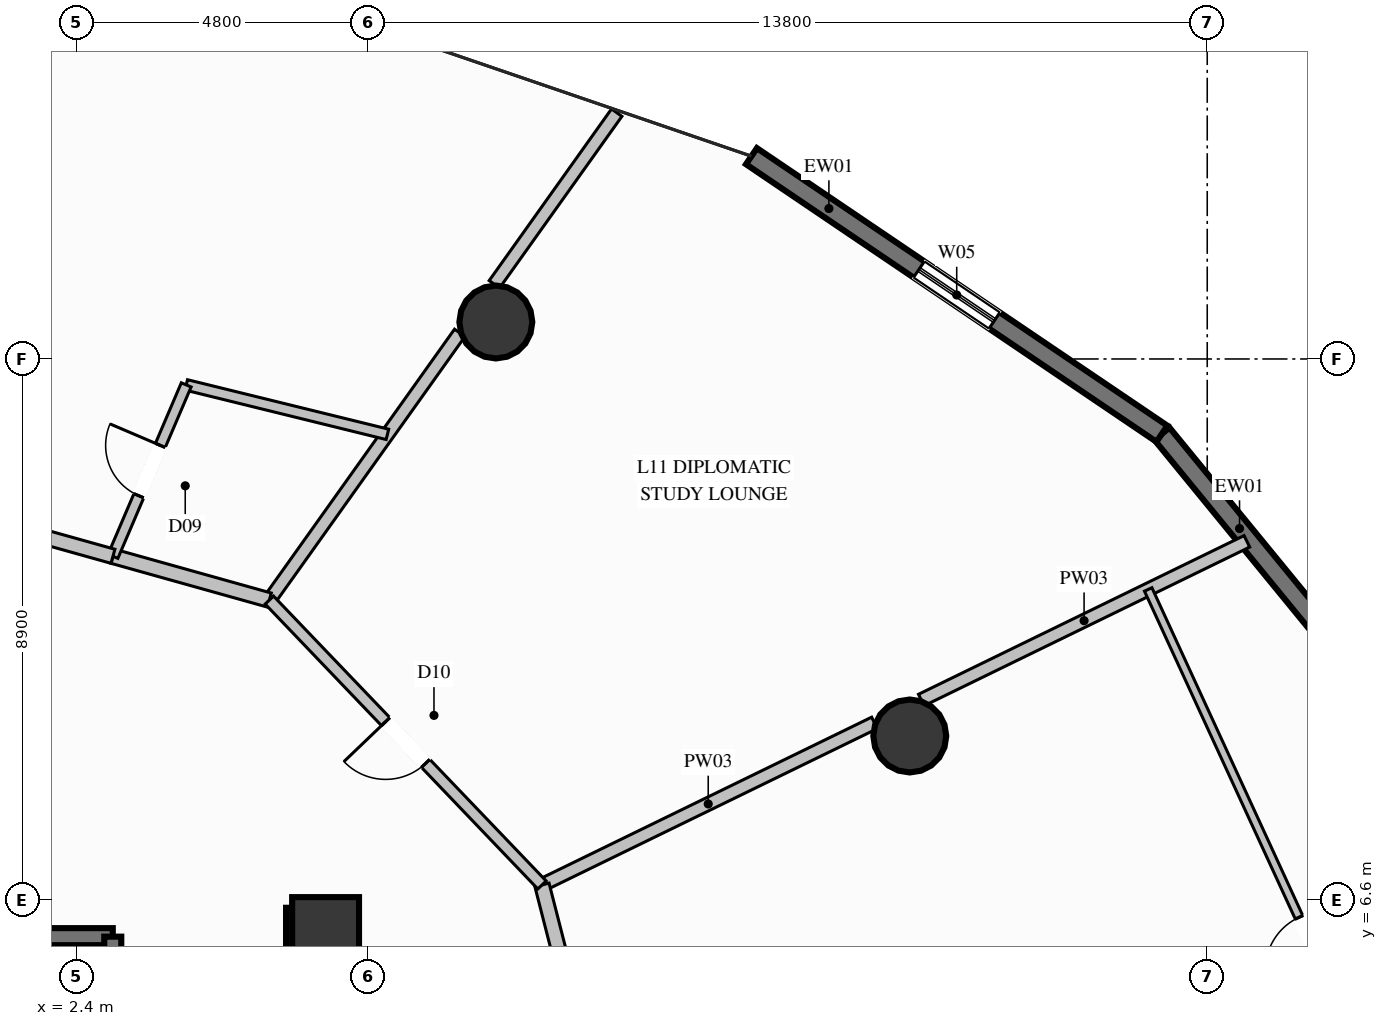
"""IFC4 building model, lengths in metres.
Left out: names, types, materials, properties, quantities, classifications, styles, units other than length and angle.
Written with IfcOpenShell. Run it as: python <this file> out.ifc"""

import sys

from ifc_helpers import new_model, si_unit, direction, frame, frame_2d, origin, origin_2d, place, context, subcontext, project, spatial, rectangle, circle, extrude, element, fill, save


model = new_model("IFC4")
c1 = context("Model", 3, precision=1e-05, world=origin(), true_north=direction((0.0, 1.0)))
c2 = subcontext(c1, "Body", "Model", "MODEL_VIEW")
j1 = project(units=[si_unit("LENGTHUNIT", "METRE"), si_unit("PLANEANGLEUNIT", "RADIAN")], contexts=[c1])
p1 = place(None, origin())
s1 = spatial("IfcSite", under=j1, at=p1, CompositionType="ELEMENT")
p2 = place(p1, origin())
s2 = spatial("IfcBuilding", under=s1, at=p2, CompositionType="ELEMENT")
p3 = place(p2, frame((0.0, 0.0, 50.0)))
s3 = spatial("IfcBuildingStorey", under=s2, at=p3, CompositionType="ELEMENT", Elevation=50.0)
p4 = place(p3, frame((6.5, 6.1, 0.0), z_axis=(0.0, 0.0, 1.0), x_axis=(1.0, 0.0, 0.0)))
e1 = element("IfcColumn", 1, at=p4, inside=s3, PredefinedType="COLUMN", context=c2, shape_type="SweptSolid", body=[
    extrude(rectangle(XDim=1.1, YDim=1.1, at=origin_2d()), origin(), (0.0, 0.0, 1.0), 3.6),
])
p5 = place(p3, frame((5.85, 6.1, 0.0), z_axis=(0.0, 0.0, 1.0), x_axis=(1.0, 0.0, 0.0)))
e2 = element("IfcWall", 2, at=p5, inside=s3, PredefinedType="SHEAR", context=c2, shape_type="SweptSolid", body=[
    extrude(rectangle(XDim=0.275, YDim=0.75, at=frame_2d((0.137, 0.0))), origin(), (0.0, 0.0, 1.0), 3.6),
])
p6 = place(p3, frame((6.5, 3.35, 0.0), z_axis=(0.0, 0.0, 1.0), x_axis=(0.0, 1.0, 0.0)))
e3 = element("IfcWall", 3, at=p6, inside=s3, PredefinedType="SHEAR", context=c2, shape_type="SweptSolid", body=[
    extrude(rectangle(XDim=3.125, YDim=0.75, at=frame_2d((1.562, 0.0))), origin(), (0.0, 0.0, 1.0), 3.6),
])
for number, where, z_axis, x_axis in (
    (4, (16.108, 9.3, 0.0), (0.0, 0.0, 1.0), (1.0, 0.0, 0.0)),
    (5, (9.3, 16.108, 0.0), (0.0, 0.0, 1.0), (1.0, 0.0, 0.0)),
):
    element("IfcColumn", number, at=place(p3, frame(where, z_axis=z_axis, x_axis=x_axis)), inside=s3, PredefinedType="COLUMN", context=c2, shape_type="SweptSolid", body=[
        extrude(circle(Radius=0.6, at=origin_2d()), origin(), (0.0, 0.0, 1.0), 3.6),
    ])
p7 = place(p3, frame((20.255, 14.27, 0.0), z_axis=(0.0, 0.0, 1.0), x_axis=(0.633484495702, -0.773755383636, 0.0)))
e6 = element("IfcWall", 6, at=p7, inside=s3, PredefinedType="SOLIDWALL", context=c2, shape_type="SweptSolid", body=[
    extrude(rectangle(XDim=7.705, YDim=0.32, at=frame_2d((3.853, 0.0))), origin(), (0.0, 0.0, 1.0), 3.34),
])
p8 = place(p7, frame((4.279, 0.0, 0.85)))
e7 = element("IfcOpeningElement", 7, at=p8, cuts=e6, PredefinedType="OPENING", context=c2, shape_type="SweptSolid", body=[
    extrude(rectangle(XDim=1.5, YDim=1.2, at=frame_2d((0.75, 0.6))), frame((0.0, 0.17, 0.0), z_axis=(0.0, -1.0, 0.0), x_axis=(1.0, 0.0, 0.0)), (0.0, 0.0, 1.0), 0.34),
])
p9 = place(p3, frame((13.504, 18.835, 0.0), z_axis=(0.0, 0.0, 1.0), x_axis=(0.828391352283, -0.560149772349, 0.0)))
e8 = element("IfcWall", 8, at=p9, inside=s3, PredefinedType="SOLIDWALL", context=c2, shape_type="SweptSolid", body=[
    extrude(rectangle(XDim=8.149, YDim=0.32, at=frame_2d((4.075, 0.0))), origin(), (0.0, 0.0, 1.0), 3.34),
])
p10 = place(p9, frame((3.325, 0.0, 0.85)))
e9 = element("IfcOpeningElement", 9, at=p10, cuts=e8, PredefinedType="OPENING", context=c2, shape_type="SweptSolid", body=[
    extrude(rectangle(XDim=1.5, YDim=1.2, at=frame_2d((0.75, 0.6))), frame((0.0, 0.17, 0.0), z_axis=(0.0, -1.0, 0.0), x_axis=(1.0, 0.0, 0.0)), (0.0, 0.0, 1.0), 0.34),
])
p11 = place(p3, frame((3.0, 6.0, 0.0), z_axis=(0.0, 0.0, 1.0), x_axis=(-1.0, 0.0, 0.0)))
e10 = element("IfcWall", 10, at=p11, inside=s3, PredefinedType="SOLIDWALL", context=c2, shape_type="SweptSolid", body=[
    extrude(rectangle(XDim=2.2, YDim=0.28, at=frame_2d((1.1, 0.0))), origin(), (0.0, 0.0, 1.0), 3.34),
])
p12 = place(p3, frame((3.0, 3.5, 0.0), z_axis=(0.0, 0.0, 1.0), x_axis=(0.0, 1.0, 0.0)))
e11 = element("IfcWall", 11, at=p12, inside=s3, PredefinedType="SOLIDWALL", context=c2, shape_type="SweptSolid", body=[
    extrude(rectangle(XDim=2.5, YDim=0.28, at=frame_2d((1.25, 0.0))), origin(), (0.0, 0.0, 1.0), 3.34),
])
p13 = place(p3, frame((10.059, 6.85, 0.0), z_axis=(0.0, 0.0, 1.0), x_axis=(0.898932322455, 0.438087525097, 0.0)))
e12 = element("IfcWall", 12, at=p13, inside=s3, PredefinedType="PARTITIONING", context=c2, shape_type="SweptSolid", body=[
    extrude(rectangle(XDim=6.083, YDim=0.21, at=frame_2d((3.042, 0.0))), origin(), (0.0, 0.0, 1.0), 2.708),
])
p14 = place(p3, frame((16.297, 9.891, 0.0), z_axis=(0.0, 0.0, 1.0), x_axis=(0.898922003025, 0.438108699386, 0.0)))
e13 = element("IfcWall", 13, at=p14, inside=s3, PredefinedType="PARTITIONING", context=c2, shape_type="SweptSolid", body=[
    extrude(rectangle(XDim=5.957, YDim=0.21, at=frame_2d((2.979, 0.0))), origin(), (0.0, 0.0, 1.0), 3.34),
])
p15 = place(p3, frame((5.575, 11.535, 0.0), z_axis=(0.0, 0.0, 1.0), x_axis=(0.580317556577, 0.814390283297, 0.0)))
e14 = element("IfcWall", 14, at=p15, inside=s3, PredefinedType="PARTITIONING", context=c2, shape_type="SweptSolid", body=[
    extrude(rectangle(XDim=5.396, YDim=0.21, at=frame_2d((2.698, 0.0))), origin(), (0.0, 0.0, 1.0), 2.708),
])
p16 = place(p3, frame((9.276, 16.728, 0.0), z_axis=(0.0, 0.0, 1.0), x_axis=(0.580431843094, 0.814308833013, 0.0)))
e15 = element("IfcWall", 15, at=p16, inside=s3, PredefinedType="PARTITIONING", context=c2, shape_type="SweptSolid", body=[
    extrude(rectangle(XDim=3.467, YDim=0.21, at=frame_2d((1.733, 0.0))), origin(), (0.0, 0.0, 1.0), 3.34),
])
p17 = place(p3, frame((5.575, 11.535, 0.0), z_axis=(0.0, 0.0, 1.0), x_axis=(-0.962983004146, 0.269562114782, 0.0)))
e16 = element("IfcWall", 16, at=p17, inside=s3, PredefinedType="PARTITIONING", context=c2, shape_type="SweptSolid", body=[
    extrude(rectangle(XDim=2.671, YDim=0.24, at=frame_2d((1.335, 0.0))), origin(), (0.0, 0.0, 1.0), 2.919),
])
p18 = place(p3, frame((7.517, 14.26, 0.0), z_axis=(0.0, 0.0, 1.0), x_axis=(-0.971054260807, 0.238859001441, 0.0)))
e17 = element("IfcWall", 17, at=p18, inside=s3, PredefinedType="PLUMBINGWALL", context=c2, shape_type="SweptSolid", body=[
    extrude(rectangle(XDim=3.408, YDim=0.175, at=frame_2d((1.704, 0.0))), origin(), (0.0, 0.0, 1.0), 3.34),
])
p19 = place(p3, frame((3.003, 12.255, 0.0), z_axis=(0.0, 0.0, 1.0), x_axis=(0.393063770017, 0.919511214016, 0.0)))
e18 = element("IfcWall", 18, at=p19, inside=s3, PredefinedType="PLUMBINGWALL", context=c2, shape_type="SweptSolid", body=[
    extrude(rectangle(XDim=3.066, YDim=0.175, at=frame_2d((1.533, 0.0))), origin(), (0.0, 0.0, 1.0), 3.34),
])
p20 = place(p19, frame((1.083, 0.0, 0.0)))
e19 = element("IfcOpeningElement", 19, at=p20, cuts=e18, PredefinedType="OPENING", context=c2, shape_type="SweptSolid", body=[
    extrude(rectangle(XDim=0.9, YDim=2.1, at=frame_2d((0.45, 1.05))), frame((0.0, 0.098, 0.0), z_axis=(0.0, -1.0, 0.0), x_axis=(1.0, 0.0, 0.0)), (0.0, 0.0, 1.0), 0.195),
])
p21 = place(p3, frame((3.003, 12.255, 0.0), z_axis=(0.0, 0.0, 1.0), x_axis=(-0.962944088122, 0.269701099648, 0.0)))
e20 = element("IfcWall", 20, at=p21, inside=s3, PredefinedType="PARTITIONING", context=c2, shape_type="SweptSolid", body=[
    extrude(rectangle(XDim=3.69, YDim=0.24, at=frame_2d((1.845, 0.0))), origin(), (0.0, 0.0, 1.0), 2.919),
])
p22 = place(p21, frame((1.295, 0.0, 0.0)))
e21 = element("IfcOpeningElement", 21, at=p22, cuts=e20, PredefinedType="OPENING", context=c2, shape_type="SweptSolid", body=[
    extrude(rectangle(XDim=1.1, YDim=2.3, at=frame_2d((0.55, 1.15))), frame((0.0, 0.13, 0.0), z_axis=(0.0, -1.0, 0.0), x_axis=(1.0, 0.0, 0.0)), (0.0, 0.0, 1.0), 0.26),
])
p23 = place(p3, frame((11.7, 0.45, 0.0), z_axis=(0.0, 0.0, 1.0), x_axis=(-0.248347790771, 0.968670932164, 0.0)))
e22 = element("IfcWall", 22, at=p23, inside=s3, PredefinedType="PARTITIONING", context=c2, shape_type="SweptSolid", body=[
    extrude(rectangle(XDim=6.607, YDim=0.24, at=frame_2d((3.304, 0.0))), origin(), (0.0, 0.0, 1.0), 2.919),
])
p24 = place(p3, frame((25.387, 0.063, 0.0), z_axis=(0.0, 0.0, 1.0), x_axis=(-0.417925097851, 0.9084814872, 0.0)))
e23 = element("IfcWall", 23, at=p24, inside=s3, PredefinedType="PARTITIONING", context=c2, shape_type="SweptSolid", body=[
    extrude(rectangle(XDim=12.82, YDim=0.135, at=frame_2d((6.41, 0.0))), origin(), (0.0, 0.0, 1.0), 2.807),
])
p25 = place(p24, frame((5.935, 0.0, 0.0)))
e24 = element("IfcOpeningElement", 24, at=p25, cuts=e23, PredefinedType="OPENING", context=c2, shape_type="SweptSolid", body=[
    extrude(rectangle(XDim=0.95, YDim=2.1, at=frame_2d((0.475, 1.05))), frame((0.0, 0.078, 0.0), z_axis=(0.0, -1.0, 0.0), x_axis=(1.0, 0.0, 0.0)), (0.0, 0.0, 1.0), 0.155),
])
p26 = place(p3, frame((10.059, 6.85, 0.0), z_axis=(0.0, 0.0, 1.0), x_axis=(-0.691464507588, 0.722410433719, 0.0)))
e25 = element("IfcWall", 25, at=p26, inside=s3, PredefinedType="PARTITIONING", context=c2, shape_type="SweptSolid", body=[
    extrude(rectangle(XDim=6.485, YDim=0.19, at=frame_2d((3.242, 0.0))), origin(), (0.0, 0.0, 1.0), 3.34),
])
p27 = place(p26, frame((2.768, 0.0, 0.0)))
e26 = element("IfcOpeningElement", 26, at=p27, cuts=e25, PredefinedType="OPENING", context=c2, shape_type="SweptSolid", body=[
    extrude(rectangle(XDim=0.95, YDim=2.1, at=frame_2d((0.475, 1.05))), frame((0.0, 0.105, 0.0), z_axis=(0.0, -1.0, 0.0), x_axis=(1.0, 0.0, 0.0)), (0.0, 0.0, 1.0), 0.21),
])
p28 = place(p10, origin())
e27 = element("IfcWindow", 27, at=p28, inside=s3, PartitioningType="SINGLE_PANEL", PredefinedType="WINDOW", context=c2, shape_type="SweptSolid", body=[
    extrude(rectangle(XDim=1.5, YDim=1.2, at=frame_2d((0.75, 0.6))), frame((0.0, 0.03, 0.0), z_axis=(0.0, -1.0, 0.0), x_axis=(1.0, 0.0, 0.0)), (0.0, 0.0, 1.0), 0.06),
])
fill(e9, e27)
p29 = place(p20, origin())
e28 = element("IfcDoor", 28, at=p29, inside=s3, OperationType="SINGLE_SWING_RIGHT", PredefinedType="DOOR", context=c2, shape_type="SweptSolid", body=[
    extrude(rectangle(XDim=0.9, YDim=2.1, at=frame_2d((0.45, 1.05))), frame((0.0, 0.025, 0.0), z_axis=(0.0, -1.0, 0.0), x_axis=(1.0, 0.0, 0.0)), (0.0, 0.0, 1.0), 0.05),
])
fill(e19, e28)
p30 = place(p25, origin())
e29 = element("IfcDoor", 29, at=p30, inside=s3, OperationType="SINGLE_SWING_LEFT", PredefinedType="DOOR", context=c2, shape_type="SweptSolid", body=[
    extrude(rectangle(XDim=0.95, YDim=2.1, at=frame_2d((0.475, 1.05))), frame((0.0, 0.025, 0.0), z_axis=(0.0, -1.0, 0.0), x_axis=(1.0, 0.0, 0.0)), (0.0, 0.0, 1.0), 0.05),
])
fill(e24, e29)
p31 = place(p27, origin())
e30 = element("IfcDoor", 30, at=p31, inside=s3, OperationType="SINGLE_SWING_RIGHT", PredefinedType="DOOR", context=c2, shape_type="SweptSolid", body=[
    extrude(rectangle(XDim=0.95, YDim=2.1, at=frame_2d((0.475, 1.05))), frame((0.0, 0.025, 0.0), z_axis=(0.0, -1.0, 0.0), x_axis=(1.0, 0.0, 0.0)), (0.0, 0.0, 1.0), 0.05),
])
fill(e26, e30)
save(model, sys.argv[1])
